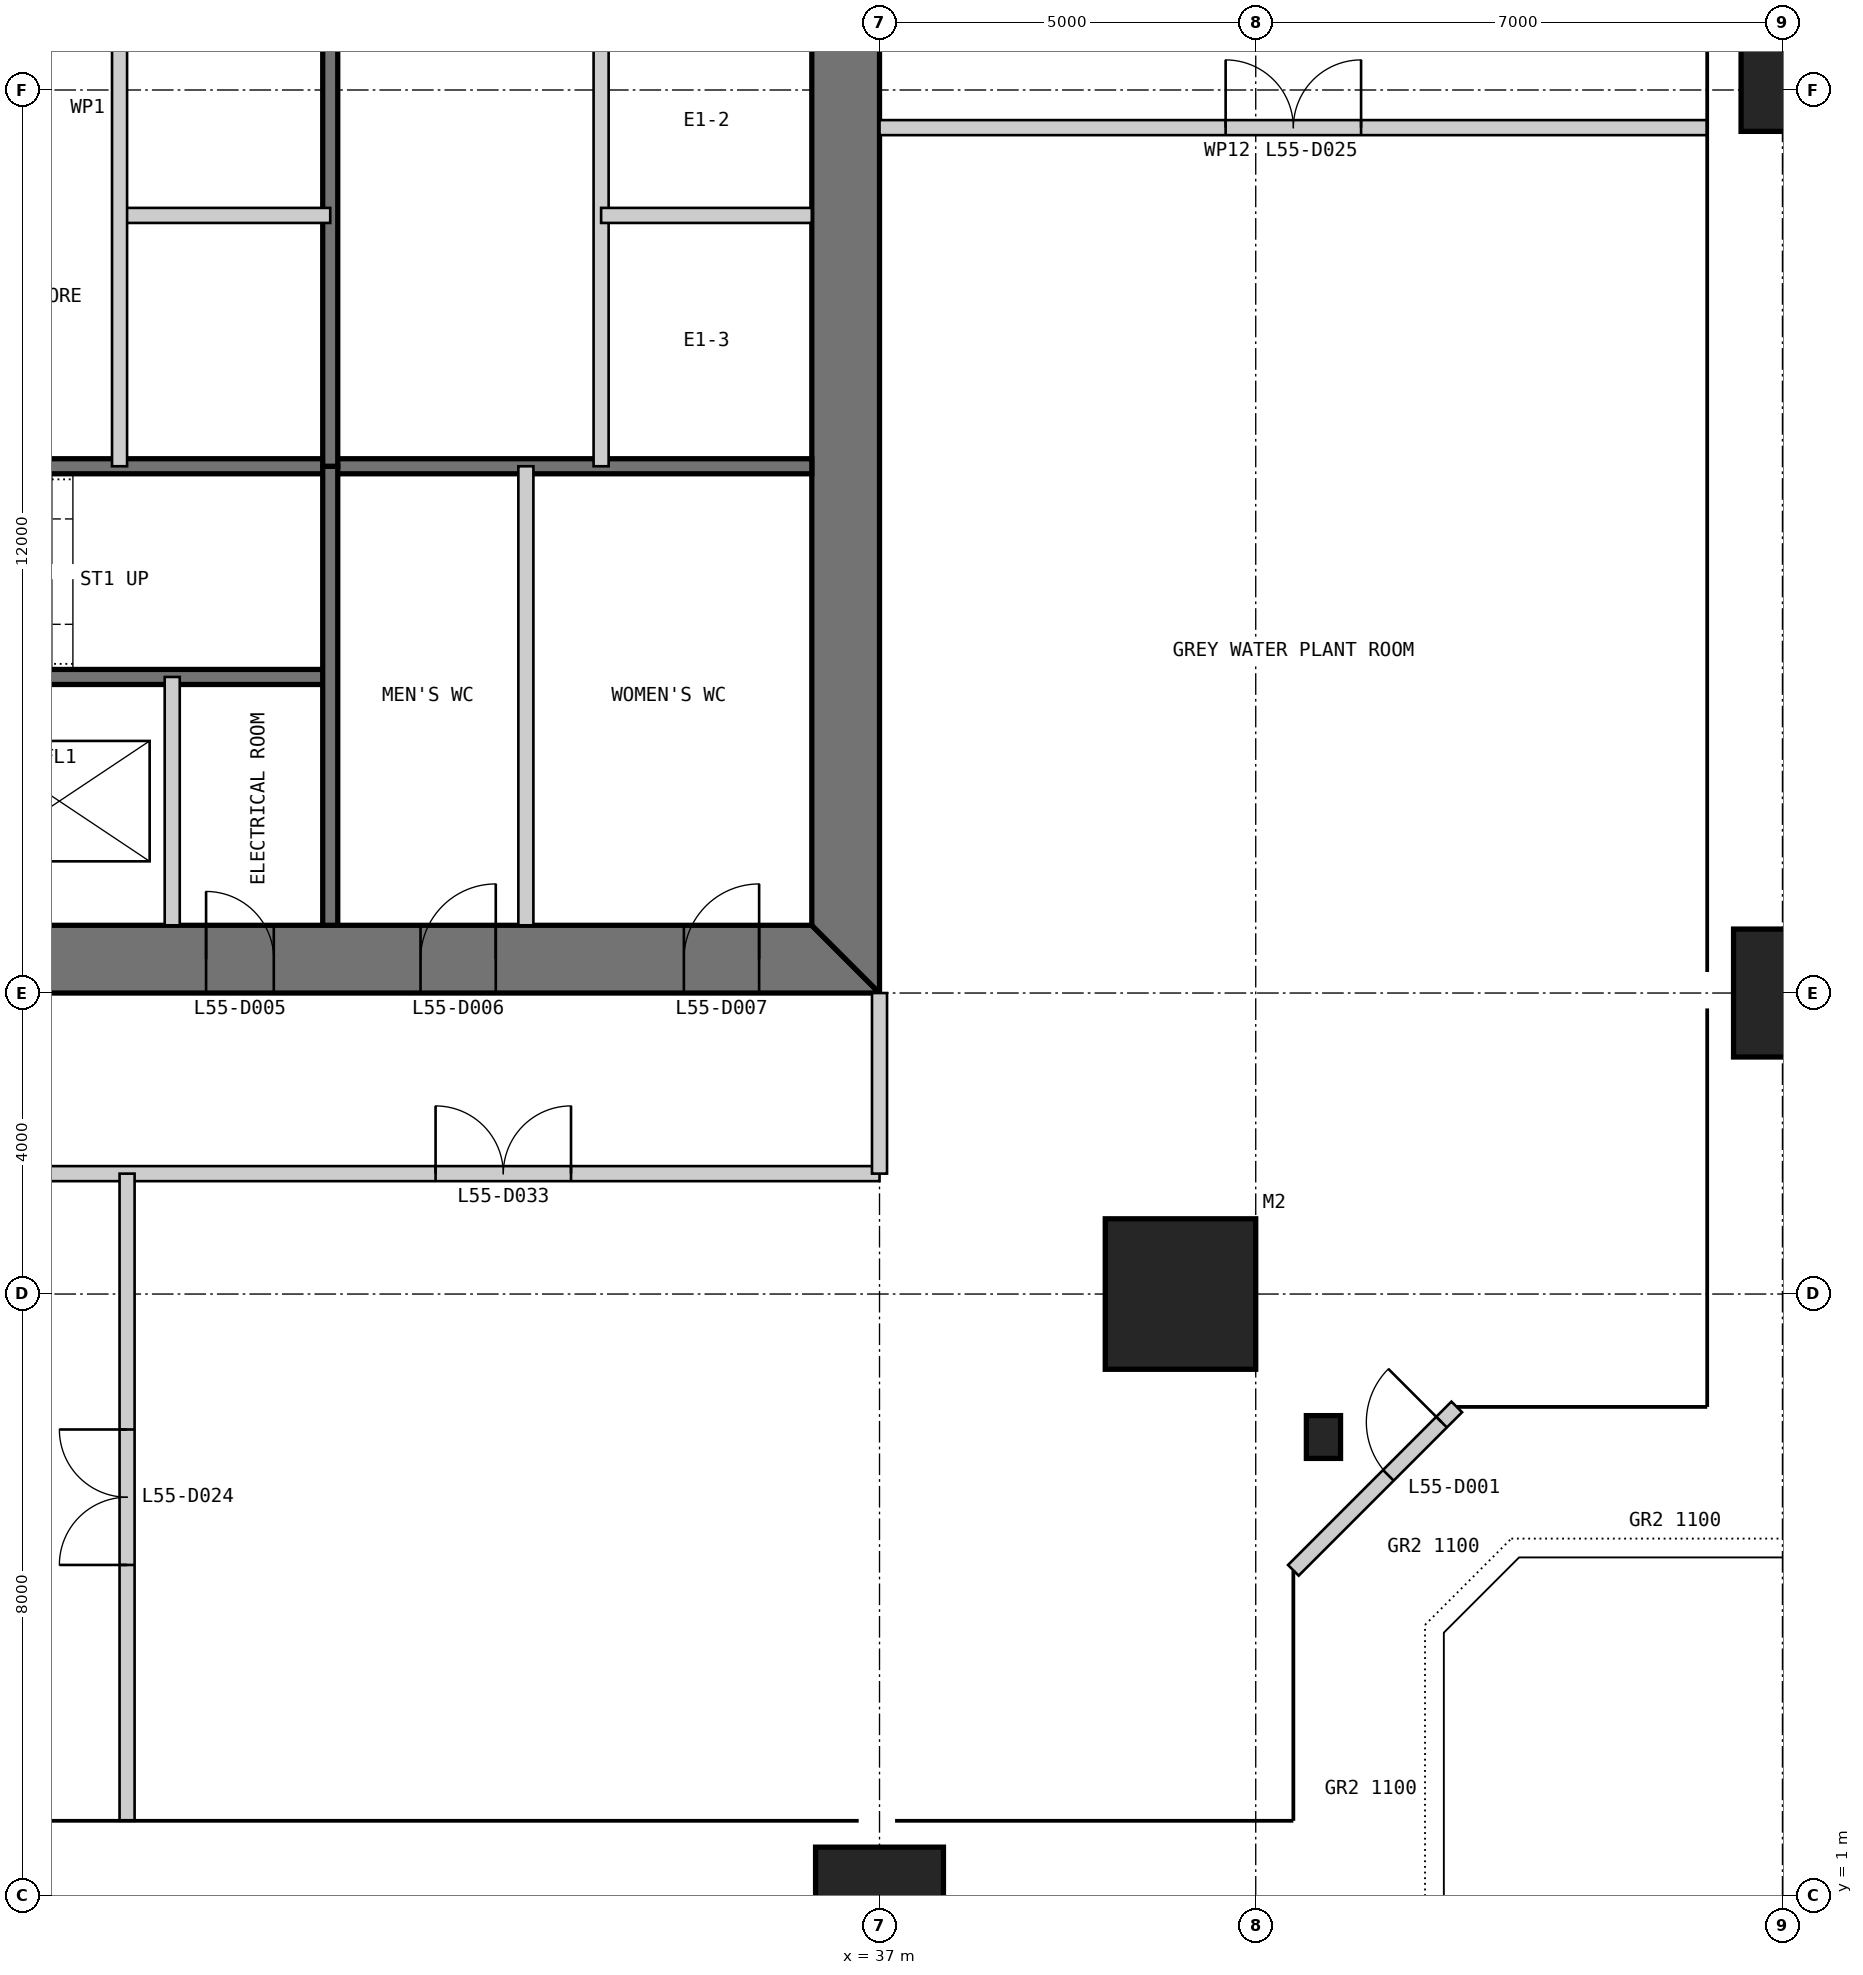
"""IFC4 building model, lengths in metres.
Left out: names, types, materials, properties, quantities, classifications, styles, units other than length and angle.
Written with IfcOpenShell. Run it as: python <this file> out.ifc"""

import sys

from ifc_helpers import new_model, si_unit, direction, frame, frame_2d, origin, origin_2d, place, context, subcontext, project, spatial, polyline, rectangle, i_section, outline, extrude, element, fill, save


model = new_model("IFC4")
c1 = context("Model", 3, precision=1e-05, world=origin(), true_north=direction((0.0, 1.0)))
c2 = subcontext(c1, "Body", "Model", "MODEL_VIEW")
j1 = project(units=[si_unit("LENGTHUNIT", "METRE"), si_unit("PLANEANGLEUNIT", "RADIAN")], contexts=[c1])
p1 = place(None, origin())
s1 = spatial("IfcSite", under=j1, at=p1, CompositionType="ELEMENT")
p2 = place(p1, origin())
s2 = spatial("IfcBuilding", under=s1, at=p2, CompositionType="ELEMENT")
p3 = place(p2, frame((0.0, 0.0, 233.8)))
s3 = spatial("IfcBuildingStorey", under=s2, at=p3, CompositionType="ELEMENT", Elevation=233.8)
p4 = place(p3, frame((41.0, 9.0, 0.0), z_axis=(0.0, 0.0, 1.0), x_axis=(1.0, 0.0, 0.0)))
e1 = element("IfcColumn", 1, at=p4, inside=s3, PredefinedType="COLUMN", context=c2, shape_type="SweptSolid", body=[
    extrude(rectangle(XDim=2.0, YDim=2.0, at=origin_2d()), origin(), (0.0, 0.0, 1.0), 6.0),
])
p5 = place(p3, frame((37.0, 1.0, 0.0), z_axis=(0.0, 0.0, 1.0), x_axis=(1.0, 0.0, 0.0)))
e2 = element("IfcColumn", 2, at=p5, inside=s3, PredefinedType="COLUMN", context=c2, shape_type="SweptSolid", body=[
    extrude(rectangle(XDim=1.7, YDim=1.3, at=origin_2d()), origin(), (0.0, 0.0, 1.0), 6.0),
])
p6 = place(p3, frame((49.0, 13.0, 0.0), z_axis=(0.0, 0.0, 1.0), x_axis=(1.0, 0.0, 0.0)))
e3 = element("IfcColumn", 3, at=p6, inside=s3, PredefinedType="COLUMN", context=c2, shape_type="SweptSolid", body=[
    extrude(rectangle(XDim=1.3, YDim=1.7, at=origin_2d()), origin(), (0.0, 0.0, 1.0), 6.0),
])
p7 = place(p3, frame((49.0, 25.0, 0.0), z_axis=(0.0, 0.0, 1.0), x_axis=(1.0, 0.0, 0.0)))
e4 = element("IfcColumn", 4, at=p7, inside=s3, PredefinedType="COLUMN", context=c2, shape_type="SweptSolid", body=[
    extrude(rectangle(XDim=1.1, YDim=1.1, at=origin_2d()), origin(), (0.0, 0.0, 1.0), 6.0),
])
p8 = place(p3, frame((42.9, 7.1, 0.0), z_axis=(0.0, 0.0, 1.0), x_axis=(1.0, 0.0, 0.0)))
e5 = element("IfcColumn", 5, at=p8, inside=s3, PredefinedType="COLUMN", context=c2, shape_type="SweptSolid", body=[
    extrude(i_section(OverallWidth=0.455, OverallDepth=0.569, WebThickness=0.078, FlangeThickness=0.125, at=origin_2d()), origin(), (0.0, 0.0, 1.0), 4.6),
])
p9 = place(p3, frame((13.0, 13.45, 0.0), z_axis=(0.0, 0.0, 1.0), x_axis=(1.0, 0.0, 0.0)))
e6 = element("IfcWall", 6, at=p9, inside=s3, PredefinedType="SHEAR", context=c2, shape_type="SweptSolid", body=[
    extrude(outline(polyline([(0.0, -0.45), (24.0, -0.45), (23.1, 0.45), (0.9, 0.45), (0.0, -0.45)])), origin(), (0.0, 0.0, 1.0), 6.0),
])
p10 = place(p9, frame((4.9, 0.0, 0.0)))
e7 = element("IfcOpeningElement", 7, at=p10, cuts=e6, PredefinedType="OPENING", context=c2, shape_type="SweptSolid", body=[
    extrude(rectangle(XDim=1.0, YDim=2.2, at=frame_2d((0.5, 1.1))), frame((0.0, 0.46, 0.0), z_axis=(0.0, -1.0, 0.0), x_axis=(1.0, 0.0, 0.0)), (0.0, 0.0, 1.0), 0.92),
])
p11 = place(p9, frame((8.9, 0.0, 0.0)))
e8 = element("IfcOpeningElement", 8, at=p11, cuts=e6, PredefinedType="OPENING", context=c2, shape_type="SweptSolid", body=[
    extrude(rectangle(XDim=1.1, YDim=2.2, at=frame_2d((0.55, 1.1))), frame((0.0, 0.46, 0.0), z_axis=(0.0, -1.0, 0.0), x_axis=(1.0, 0.0, 0.0)), (0.0, 0.0, 1.0), 0.92),
])
p12 = place(p9, frame((15.05, 0.0, 0.0)))
e9 = element("IfcOpeningElement", 9, at=p12, cuts=e6, PredefinedType="OPENING", context=c2, shape_type="SweptSolid", body=[
    extrude(rectangle(XDim=0.9, YDim=2.2, at=frame_2d((0.45, 1.1))), frame((0.0, 0.46, 0.0), z_axis=(0.0, -1.0, 0.0), x_axis=(1.0, 0.0, 0.0)), (0.0, 0.0, 1.0), 0.92),
])
p13 = place(p9, frame((17.9, 0.0, 0.0)))
e10 = element("IfcOpeningElement", 10, at=p13, cuts=e6, PredefinedType="OPENING", context=c2, shape_type="SweptSolid", body=[
    extrude(rectangle(XDim=1.0, YDim=2.2, at=frame_2d((0.5, 1.1))), frame((0.0, 0.46, 0.0), z_axis=(0.0, -1.0, 0.0), x_axis=(1.0, 0.0, 0.0)), (0.0, 0.0, 1.0), 0.92),
])
p14 = place(p9, frame((21.4, 0.0, 0.0)))
e11 = element("IfcOpeningElement", 11, at=p14, cuts=e6, PredefinedType="OPENING", context=c2, shape_type="SweptSolid", body=[
    extrude(rectangle(XDim=1.0, YDim=2.2, at=frame_2d((0.5, 1.1))), frame((0.0, 0.46, 0.0), z_axis=(0.0, -1.0, 0.0), x_axis=(1.0, 0.0, 0.0)), (0.0, 0.0, 1.0), 0.92),
])
p15 = place(p3, frame((36.55, 13.9, 0.0), z_axis=(0.0, 0.0, 1.0), x_axis=(0.0, 1.0, 0.0)))
e12 = element("IfcWall", 12, at=p15, inside=s3, PredefinedType="SHEAR", context=c2, shape_type="SweptSolid", body=[
    extrude(outline(polyline([(-0.9, -0.45), (23.1, -0.45), (22.2, 0.45), (0.0, 0.45), (-0.9, -0.45)])), origin(), (0.0, 0.0, 1.0), 6.0),
])
p16 = place(p15, frame((20.2, 0.0, 0.0)))
e13 = element("IfcOpeningElement", 13, at=p16, cuts=e12, PredefinedType="OPENING", context=c2, shape_type="SweptSolid", body=[
    extrude(rectangle(XDim=1.0, YDim=2.2, at=frame_2d((0.5, 1.1))), frame((0.0, 0.46, 0.0), z_axis=(0.0, -1.0, 0.0), x_axis=(1.0, 0.0, 0.0)), (0.0, 0.0, 1.0), 0.92),
])
p17 = place(p15, frame((17.25, 0.0, 0.0)))
e14 = element("IfcOpeningElement", 14, at=p17, cuts=e12, PredefinedType="OPENING", context=c2, shape_type="SweptSolid", body=[
    extrude(rectangle(XDim=0.9, YDim=2.2, at=frame_2d((0.45, 1.1))), frame((0.0, 0.46, 0.0), z_axis=(0.0, -1.0, 0.0), x_axis=(1.0, 0.0, 0.0)), (0.0, 0.0, 1.0), 0.92),
])
p18 = place(p3, frame((42.5, 5.328, 0.0), z_axis=(0.0, 0.0, 1.0), x_axis=(0.707106781187, 0.707106781187, 0.0)))
e15 = element("IfcWall", 15, at=p18, inside=s3, PredefinedType="SOLIDWALL", context=c2, shape_type="SweptSolid", body=[
    extrude(rectangle(XDim=3.071, YDim=0.2, at=frame_2d((1.536, 0.0))), origin(), (0.0, 0.0, 1.0), 4.6),
])
p19 = place(p18, frame((1.786, 0.0, 0.0)))
e16 = element("IfcOpeningElement", 16, at=p19, cuts=e15, PredefinedType="OPENING", context=c2, shape_type="SweptSolid", body=[
    extrude(rectangle(XDim=1.0, YDim=2.2, at=frame_2d((0.5, 1.1))), frame((0.0, 0.11, 0.0), z_axis=(0.0, -1.0, 0.0), x_axis=(1.0, 0.0, 0.0)), (0.0, 0.0, 1.0), 0.22),
])
p20 = place(p3, frame((20.3, 17.2, 0.0), z_axis=(0.0, 0.0, 1.0), x_axis=(1.0, 0.0, 0.0)))
e17 = element("IfcWall", 17, at=p20, inside=s3, PredefinedType="SOLIDWALL", context=c2, shape_type="SweptSolid", body=[
    extrude(rectangle(XDim=9.4, YDim=0.2, at=frame_2d((4.7, 0.0))), origin(), (0.0, 0.0, 1.0), 5.8),
])
p21 = place(p20, frame((0.25, 0.0, 0.0)))
e18 = element("IfcOpeningElement", 18, at=p21, cuts=e17, PredefinedType="OPENING", context=c2, shape_type="SweptSolid", body=[
    extrude(rectangle(XDim=1.0, YDim=2.2, at=frame_2d((0.5, 1.1))), frame((0.0, 0.11, 0.0), z_axis=(0.0, -1.0, 0.0), x_axis=(1.0, 0.0, 0.0)), (0.0, 0.0, 1.0), 0.22),
])
p22 = place(p3, frame((20.3, 20.0, 0.0), z_axis=(0.0, 0.0, 1.0), x_axis=(1.0, 0.0, 0.0)))
e19 = element("IfcWall", 19, at=p22, inside=s3, PredefinedType="SOLIDWALL", context=c2, shape_type="SweptSolid", body=[
    extrude(rectangle(XDim=15.8, YDim=0.2, at=frame_2d((7.9, 0.0))), origin(), (0.0, 0.0, 1.0), 5.8),
])
p23 = place(p3, frame((27.6, 13.9, 0.0), z_axis=(0.0, 0.0, 1.0), x_axis=(0.0, 1.0, 0.0)))
e20 = element("IfcWall", 20, at=p23, inside=s3, PredefinedType="PARTITIONING", context=c2, shape_type="SweptSolid", body=[
    extrude(rectangle(XDim=3.3, YDim=0.2, at=frame_2d((1.65, 0.0))), origin(), (0.0, 0.0, 1.0), 5.8),
])
p24 = place(p3, frame((29.7, 13.9, 0.0), z_axis=(0.0, 0.0, 1.0), x_axis=(0.0, 1.0, 0.0)))
e21 = element("IfcWall", 21, at=p24, inside=s3, PredefinedType="SOLIDWALL", context=c2, shape_type="SweptSolid", body=[
    extrude(rectangle(XDim=6.1, YDim=0.2, at=frame_2d((3.05, 0.0))), origin(), (0.0, 0.0, 1.0), 5.8),
])
p25 = place(p3, frame((32.3, 13.9, 0.0), z_axis=(0.0, 0.0, 1.0), x_axis=(0.0, 1.0, 0.0)))
e22 = element("IfcWall", 22, at=p25, inside=s3, PredefinedType="PARTITIONING", context=c2, shape_type="SweptSolid", body=[
    extrude(rectangle(XDim=6.1, YDim=0.2, at=frame_2d((3.05, 0.0))), origin(), (0.0, 0.0, 1.0), 5.8),
])
p26 = place(p3, frame((33.3, 36.1, 0.0), z_axis=(0.0, 0.0, 1.0), x_axis=(0.0, -1.0, 0.0)))
e23 = element("IfcWall", 23, at=p26, inside=s3, PredefinedType="PARTITIONING", context=c2, shape_type="SweptSolid", body=[
    extrude(rectangle(XDim=16.1, YDim=0.2, at=frame_2d((8.05, 0.0))), origin(), (0.0, 0.0, 1.0), 5.8),
])
p27 = place(p3, frame((29.7, 36.1, 0.0), z_axis=(0.0, 0.0, 1.0), x_axis=(0.0, -1.0, 0.0)))
e24 = element("IfcWall", 24, at=p27, inside=s3, PredefinedType="SOLIDWALL", context=c2, shape_type="SweptSolid", body=[
    extrude(rectangle(XDim=16.1, YDim=0.2, at=frame_2d((8.05, 0.0))), origin(), (0.0, 0.0, 1.0), 5.8),
])
for number, where, z_axis, x_axis in (
    (25, (36.1, 23.333, 0.0), (0.0, 0.0, 1.0), (-1.0, 0.0, 0.0)),
    (26, (29.7, 23.333, 0.0), (0.0, 0.0, 1.0), (-1.0, 0.0, 0.0)),
):
    element("IfcWall", number, at=place(p3, frame(where, z_axis=z_axis, x_axis=x_axis)), inside=s3, PredefinedType="PARTITIONING", context=c2, shape_type="SweptSolid", body=[
        extrude(rectangle(XDim=2.8, YDim=0.2, at=frame_2d((1.4, 0.0))), origin(), (0.0, 0.0, 1.0), 5.8),
    ])
p28 = place(p3, frame((26.9, 30.0, 0.0), z_axis=(0.0, 0.0, 1.0), x_axis=(0.0, -1.0, 0.0)))
e27 = element("IfcWall", 27, at=p28, inside=s3, PredefinedType="PARTITIONING", context=c2, shape_type="SweptSolid", body=[
    extrude(rectangle(XDim=10.0, YDim=0.2, at=frame_2d((5.0, 0.0))), origin(), (0.0, 0.0, 1.0), 5.8),
])
p29 = place(p3, frame((13.0, 10.6, 0.0), z_axis=(0.0, 0.0, 1.0), x_axis=(1.0, 0.0, 0.0)))
e28 = element("IfcWall", 28, at=p29, inside=s3, PredefinedType="PARTITIONING", context=c2, shape_type="SweptSolid", body=[
    extrude(rectangle(XDim=24.0, YDim=0.2, at=frame_2d((12.0, 0.0))), origin(), (0.0, 0.0, 1.0), 5.8),
])
p30 = place(p29, frame((2.35, 0.0, 0.0)))
e29 = element("IfcOpeningElement", 29, at=p30, cuts=e28, PredefinedType="OPENING", context=c2, shape_type="SweptSolid", body=[
    extrude(rectangle(XDim=1.8, YDim=2.4, at=frame_2d((0.9, 1.2))), frame((0.0, 0.11, 0.0), z_axis=(0.0, -1.0, 0.0), x_axis=(1.0, 0.0, 0.0)), (0.0, 0.0, 1.0), 0.22),
])
p31 = place(p29, frame((9.35, 0.0, 0.0)))
e30 = element("IfcOpeningElement", 30, at=p31, cuts=e28, PredefinedType="OPENING", context=c2, shape_type="SweptSolid", body=[
    extrude(rectangle(XDim=1.8, YDim=2.4, at=frame_2d((0.9, 1.2))), frame((0.0, 0.11, 0.0), z_axis=(0.0, -1.0, 0.0), x_axis=(1.0, 0.0, 0.0)), (0.0, 0.0, 1.0), 0.22),
])
p32 = place(p29, frame((18.1, 0.0, 0.0)))
e31 = element("IfcOpeningElement", 31, at=p32, cuts=e28, PredefinedType="OPENING", context=c2, shape_type="SweptSolid", body=[
    extrude(rectangle(XDim=1.8, YDim=2.4, at=frame_2d((0.9, 1.2))), frame((0.0, 0.11, 0.0), z_axis=(0.0, -1.0, 0.0), x_axis=(1.0, 0.0, 0.0)), (0.0, 0.0, 1.0), 0.22),
])
p33 = place(p3, frame((37.0, 10.6, 0.0), z_axis=(0.0, 0.0, 1.0), x_axis=(0.0, 1.0, 0.0)))
e32 = element("IfcWall", 32, at=p33, inside=s3, PredefinedType="PARTITIONING", context=c2, shape_type="SweptSolid", body=[
    extrude(rectangle(XDim=2.4, YDim=0.2, at=frame_2d((1.2, 0.0))), origin(), (0.0, 0.0, 1.0), 4.705),
])
p34 = place(p3, frame((27.0, 2.0, 0.0), z_axis=(0.0, 0.0, 1.0), x_axis=(0.0, 1.0, 0.0)))
e33 = element("IfcWall", 33, at=p34, inside=s3, PredefinedType="PARTITIONING", context=c2, shape_type="SweptSolid", body=[
    extrude(rectangle(XDim=8.6, YDim=0.2, at=frame_2d((4.3, 0.0))), origin(), (0.0, 0.0, 1.0), 5.8),
])
p35 = place(p34, frame((3.4, 0.0, 0.0)))
e34 = element("IfcOpeningElement", 34, at=p35, cuts=e33, PredefinedType="OPENING", context=c2, shape_type="SweptSolid", body=[
    extrude(rectangle(XDim=1.8, YDim=2.4, at=frame_2d((0.9, 1.2))), frame((0.0, 0.11, 0.0), z_axis=(0.0, -1.0, 0.0), x_axis=(1.0, 0.0, 0.0)), (0.0, 0.0, 1.0), 0.22),
])
p36 = place(p3, frame((37.0, 24.5, 0.0), z_axis=(0.0, 0.0, 1.0), x_axis=(1.0, 0.0, 0.0)))
e35 = element("IfcWall", 35, at=p36, inside=s3, PredefinedType="PARTITIONING", context=c2, shape_type="SweptSolid", body=[
    extrude(rectangle(XDim=11.0, YDim=0.2, at=frame_2d((5.5, 0.0))), origin(), (0.0, 0.0, 1.0), 5.8),
])
p37 = place(p36, frame((4.6, 0.0, 0.0)))
e36 = element("IfcOpeningElement", 36, at=p37, cuts=e35, PredefinedType="OPENING", context=c2, shape_type="SweptSolid", body=[
    extrude(rectangle(XDim=1.8, YDim=2.4, at=frame_2d((0.9, 1.2))), frame((0.0, 0.11, 0.0), z_axis=(0.0, -1.0, 0.0), x_axis=(1.0, 0.0, 0.0)), (0.0, 0.0, 1.0), 0.22),
])
p38 = place(p19, origin())
e37 = element("IfcDoor", 37, at=p38, inside=s3, OperationType="SINGLE_SWING_RIGHT", PredefinedType="DOOR", context=c2, shape_type="SweptSolid", body=[
    extrude(rectangle(XDim=1.0, YDim=2.2, at=frame_2d((0.5, 1.1))), frame((0.0, 0.025, 0.0), z_axis=(0.0, -1.0, 0.0), x_axis=(1.0, 0.0, 0.0)), (0.0, 0.0, 1.0), 0.05),
])
fill(e16, e37)
p39 = place(p12, origin())
e38 = element("IfcDoor", 38, at=p39, inside=s3, OperationType="SINGLE_SWING_LEFT", PredefinedType="DOOR", context=c2, shape_type="SweptSolid", body=[
    extrude(rectangle(XDim=0.9, YDim=2.2, at=frame_2d((0.45, 1.1))), frame((0.0, 0.025, 0.0), z_axis=(0.0, -1.0, 0.0), x_axis=(1.0, 0.0, 0.0)), (0.0, 0.0, 1.0), 0.05),
    extrude(outline(polyline([(0.0, 0.0), (0.04, 0.0), (0.04, 2.16), (0.86, 2.16), (0.86, 0.0), (0.9, 0.0), (0.9, 2.2), (0.0, 2.2), (0.0, 0.0)])), frame((0.0, 0.3, 0.0), z_axis=(0.0, -1.0, 0.0), x_axis=(1.0, 0.0, 0.0)), (0.0, 0.0, 1.0), 0.6),
])
fill(e9, e38)
p40 = place(p13, origin())
e39 = element("IfcDoor", 39, at=p40, inside=s3, OperationType="SINGLE_SWING_RIGHT", PredefinedType="DOOR", context=c2, shape_type="SweptSolid", body=[
    extrude(rectangle(XDim=1.0, YDim=2.2, at=frame_2d((0.5, 1.1))), frame((0.0, 0.025, 0.0), z_axis=(0.0, -1.0, 0.0), x_axis=(1.0, 0.0, 0.0)), (0.0, 0.0, 1.0), 0.05),
    extrude(outline(polyline([(0.0, 0.0), (0.04, 0.0), (0.04, 2.16), (0.96, 2.16), (0.96, 0.0), (1.0, 0.0), (1.0, 2.2), (0.0, 2.2), (0.0, 0.0)])), frame((0.0, 0.3, 0.0), z_axis=(0.0, -1.0, 0.0), x_axis=(1.0, 0.0, 0.0)), (0.0, 0.0, 1.0), 0.6),
])
fill(e10, e39)
p41 = place(p14, origin())
e40 = element("IfcDoor", 40, at=p41, inside=s3, OperationType="SINGLE_SWING_RIGHT", PredefinedType="DOOR", context=c2, shape_type="SweptSolid", body=[
    extrude(rectangle(XDim=1.0, YDim=2.2, at=frame_2d((0.5, 1.1))), frame((0.0, 0.025, 0.0), z_axis=(0.0, -1.0, 0.0), x_axis=(1.0, 0.0, 0.0)), (0.0, 0.0, 1.0), 0.05),
    extrude(outline(polyline([(0.0, 0.0), (0.04, 0.0), (0.04, 2.16), (0.96, 2.16), (0.96, 0.0), (1.0, 0.0), (1.0, 2.2), (0.0, 2.2), (0.0, 0.0)])), frame((0.0, 0.3, 0.0), z_axis=(0.0, -1.0, 0.0), x_axis=(1.0, 0.0, 0.0)), (0.0, 0.0, 1.0), 0.6),
])
fill(e11, e40)
p42 = place(p35, origin())
e41 = element("IfcDoor", 41, at=p42, inside=s3, OperationType="DOUBLE_DOOR_SINGLE_SWING", PredefinedType="DOOR", context=c2, shape_type="SweptSolid", body=[
    extrude(rectangle(XDim=1.8, YDim=2.4, at=frame_2d((0.9, 1.2))), frame((0.0, 0.025, 0.0), z_axis=(0.0, -1.0, 0.0), x_axis=(1.0, 0.0, 0.0)), (0.0, 0.0, 1.0), 0.05),
])
fill(e34, e41)
p43 = place(p37, origin())
e42 = element("IfcDoor", 42, at=p43, inside=s3, OperationType="DOUBLE_DOOR_SINGLE_SWING", PredefinedType="DOOR", context=c2, shape_type="SweptSolid", body=[
    extrude(rectangle(XDim=1.8, YDim=2.4, at=frame_2d((0.9, 1.2))), frame((0.0, 0.025, 0.0), z_axis=(0.0, -1.0, 0.0), x_axis=(1.0, 0.0, 0.0)), (0.0, 0.0, 1.0), 0.05),
])
fill(e36, e42)
p44 = place(p32, origin())
e43 = element("IfcDoor", 43, at=p44, inside=s3, OperationType="DOUBLE_DOOR_SINGLE_SWING", PredefinedType="DOOR", context=c2, shape_type="SweptSolid", body=[
    extrude(rectangle(XDim=1.8, YDim=2.4, at=frame_2d((0.9, 1.2))), frame((0.0, 0.025, 0.0), z_axis=(0.0, -1.0, 0.0), x_axis=(1.0, 0.0, 0.0)), (0.0, 0.0, 1.0), 0.05),
])
fill(e31, e43)
save(model, sys.argv[1])
